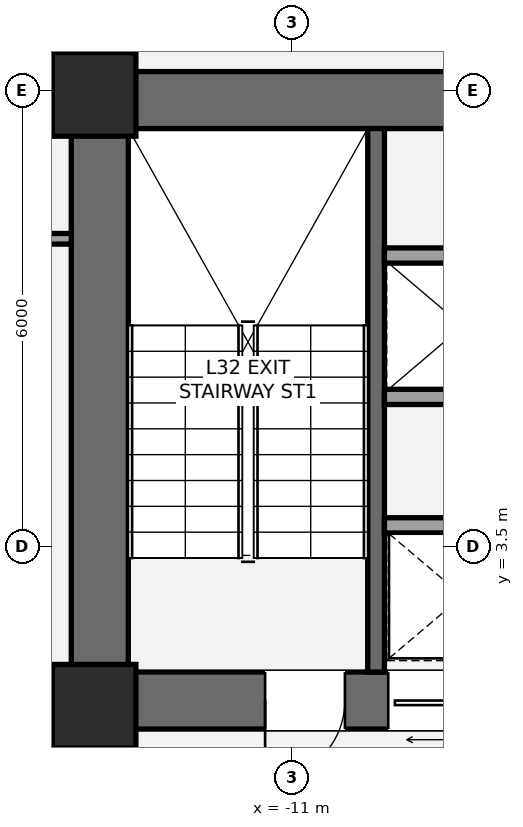
"""IFC4 building model, lengths in metres.
Left out: names, types, materials, properties, quantities, classifications, styles, units other than length and angle.
Written with IfcOpenShell. Run it as: python <this file> out.ifc"""

import sys

from ifc_helpers import new_model, si_unit, direction, frame, frame_2d, origin, origin_2d, place, context, subcontext, project, spatial, rectangle, extrude, element, fill, save


model = new_model("IFC4")
c1 = context("Model", 3, precision=1e-05, world=origin(), true_north=direction((0.0, 1.0)))
c2 = subcontext(c1, "Body", "Model", "MODEL_VIEW")
j1 = project(units=[si_unit("LENGTHUNIT", "METRE"), si_unit("PLANEANGLEUNIT", "RADIAN")], contexts=[c1])
p1 = place(None, origin())
s1 = spatial("IfcSite", under=j1, at=p1, CompositionType="ELEMENT")
p2 = place(p1, origin())
s2 = spatial("IfcBuilding", under=s1, at=p2, CompositionType="ELEMENT")
p3 = place(p2, frame((0.0, 0.0, 121.1)))
s3 = spatial("IfcBuildingStorey", under=s2, at=p3, CompositionType="ELEMENT", Elevation=121.1)
p4 = place(p3, frame((-13.525, 1.1, 0.0), z_axis=(0.0, 0.0, 1.0), x_axis=(0.0, 1.0, 0.0)))
e1 = element("IfcWall", 1, at=p4, inside=s3, PredefinedType="SHEAR", context=c2, shape_type="SweptSolid", body=[
    extrude(rectangle(XDim=8.65, YDim=0.75, at=frame_2d((4.325, 0.0))), origin(), (0.0, 0.0, 1.0), 3.5),
])
p5 = place(p3, frame((-13.9, 9.375, 0.0), z_axis=(0.0, 0.0, 1.0), x_axis=(1.0, 0.0, 0.0)))
e2 = element("IfcWall", 2, at=p5, inside=s3, PredefinedType="SHEAR", context=c2, shape_type="SweptSolid", body=[
    extrude(rectangle(XDim=9.475, YDim=0.75, at=frame_2d((4.737, 0.0))), origin(), (0.0, 0.0, 1.0), 3.5),
])
p6 = place(p3, frame((-4.825, 1.475, 0.0), z_axis=(0.0, 0.0, 1.0), x_axis=(-1.0, 0.0, 0.0)))
e3 = element("IfcWall", 3, at=p6, inside=s3, PredefinedType="SHEAR", context=c2, shape_type="SweptSolid", body=[
    extrude(rectangle(XDim=9.075, YDim=0.75, at=frame_2d((4.538, 0.0))), origin(), (0.0, 0.0, 1.0), 3.5),
])
p7 = place(p6, frame((5.475, 0.0, 0.0)))
e4 = element("IfcOpeningElement", 4, at=p7, cuts=e3, PredefinedType="OPENING", context=c2, shape_type="SweptSolid", body=[
    extrude(rectangle(XDim=1.05, YDim=2.15, at=frame_2d((0.525, 1.075))), frame((0.0, 0.385, 0.0), z_axis=(0.0, -1.0, 0.0), x_axis=(1.0, 0.0, 0.0)), (0.0, 0.0, 1.0), 0.77),
])
p8 = place(p6, frame((3.805, 0.0, 0.0)))
e5 = element("IfcOpeningElement", 5, at=p8, cuts=e3, PredefinedType="OPENING", context=c2, shape_type="SweptSolid", body=[
    extrude(rectangle(XDim=1.1, YDim=2.2, at=frame_2d((0.55, 1.1))), frame((0.0, 0.385, 0.0), z_axis=(0.0, -1.0, 0.0), x_axis=(1.0, 0.0, 0.0)), (0.0, 0.0, 1.0), 0.77),
])
p9 = place(p3, frame((-9.89, 1.85, 0.0), z_axis=(0.0, 0.0, 1.0), x_axis=(0.0, 1.0, 0.0)))
e6 = element("IfcWall", 6, at=p9, inside=s3, PredefinedType="SHEAR", context=c2, shape_type="SweptSolid", body=[
    extrude(rectangle(XDim=7.15, YDim=0.22, at=frame_2d((3.575, 0.0))), origin(), (0.0, 0.0, 1.0), 3.5),
])
for number, where, z_axis, x_axis in (
    (7, (-13.6, 1.4, 0.0), (0.0, 0.0, 1.0), (1.0, 0.0, 0.0)),
    (8, (-13.6, 9.45, 0.0), (0.0, 0.0, 1.0), (1.0, 0.0, 0.0)),
):
    element("IfcColumn", number, at=place(p3, frame(where, z_axis=z_axis, x_axis=x_axis)), inside=s3, PredefinedType="COLUMN", context=c2, shape_type="SweptSolid", body=[
        extrude(rectangle(XDim=1.1, YDim=1.1, at=origin_2d()), origin(), (0.0, 0.0, 1.0), 3.5),
    ])
p10 = place(p3, frame((-13.45, -2.15, 0.0), z_axis=(0.0, 0.0, 1.0), x_axis=(0.0, 1.0, 0.0)))
e9 = element("IfcWall", 9, at=p10, inside=s3, PredefinedType="PARTITIONING", context=c2, shape_type="SweptSolid", body=[
    extrude(rectangle(XDim=3.3, YDim=0.165, at=frame_2d((1.65, 0.0))), origin(), (0.0, 0.0, 1.0), 2.763),
])
p11 = place(p10, frame((1.15, 0.0, 0.0)))
e10 = element("IfcOpeningElement", 10, at=p11, cuts=e9, PredefinedType="OPENING", context=c2, shape_type="SweptSolid", body=[
    extrude(rectangle(XDim=1.05, YDim=2.15, at=frame_2d((0.525, 1.075))), frame((0.0, 0.093, 0.0), z_axis=(0.0, -1.0, 0.0), x_axis=(1.0, 0.0, 0.0)), (0.0, 0.0, 1.0), 0.185),
])
for number, where, z_axis, x_axis in (
    (11, (-9.78, 3.78, 0.0), (0.0, 0.0, 1.0), (1.0, 0.0, 0.0)),
    (12, (-9.78, 5.47, 0.0), (0.0, 0.0, 1.0), (1.0, 0.0, 0.0)),
    (13, (-9.78, 7.33, 0.0), (0.0, 0.0, 1.0), (1.0, 0.0, 0.0)),
):
    element("IfcWall", number, at=place(p3, frame(where, z_axis=z_axis, x_axis=x_axis)), inside=s3, PredefinedType="SOLIDWALL", context=c2, shape_type="SweptSolid", body=[
        extrude(rectangle(XDim=4.205, YDim=0.2, at=frame_2d((2.103, 0.0))), origin(), (0.0, 0.0, 1.0), 3.31),
    ])
p12 = place(p3, frame((-16.2, 7.55, 0.0), z_axis=(0.0, 0.0, 1.0), x_axis=(1.0, 0.0, 0.0)))
e14 = element("IfcWall", 14, at=p12, inside=s3, PredefinedType="PARTITIONING", context=c2, shape_type="SweptSolid", body=[
    extrude(rectangle(XDim=2.3, YDim=0.14, at=frame_2d((1.15, 0.0))), origin(), (0.0, 0.0, 1.0), 3.31),
])
p13 = place(p12, frame((0.32, 0.0, 0.0)))
e15 = element("IfcOpeningElement", 15, at=p13, cuts=e14, PredefinedType="OPENING", context=c2, shape_type="SweptSolid", body=[
    extrude(rectangle(XDim=0.92, YDim=2.15, at=frame_2d((0.46, 1.075))), frame((0.0, 0.08, 0.0), z_axis=(0.0, -1.0, 0.0), x_axis=(1.0, 0.0, 0.0)), (0.0, 0.0, 1.0), 0.16),
])
p14 = place(p7, origin())
e16 = element("IfcDoor", 16, at=p14, inside=s3, OperationType="SINGLE_SWING_RIGHT", PredefinedType="DOOR", context=c2, shape_type="SweptSolid", body=[
    extrude(rectangle(XDim=1.05, YDim=2.15, at=frame_2d((0.525, 1.075))), frame((0.0, 0.025, 0.0), z_axis=(0.0, -1.0, 0.0), x_axis=(1.0, 0.0, 0.0)), (0.0, 0.0, 1.0), 0.05),
])
fill(e4, e16)
p15 = place(p8, origin())
e17 = element("IfcDoor", 17, at=p15, inside=s3, OperationType="SLIDING_TO_LEFT", PredefinedType="DOOR", context=c2, shape_type="SweptSolid", body=[
    extrude(rectangle(XDim=1.1, YDim=2.2, at=frame_2d((0.55, 1.1))), frame((0.0, 0.025, 0.0), z_axis=(0.0, -1.0, 0.0), x_axis=(1.0, 0.0, 0.0)), (0.0, 0.0, 1.0), 0.05),
])
fill(e5, e17)
save(model, sys.argv[1])
